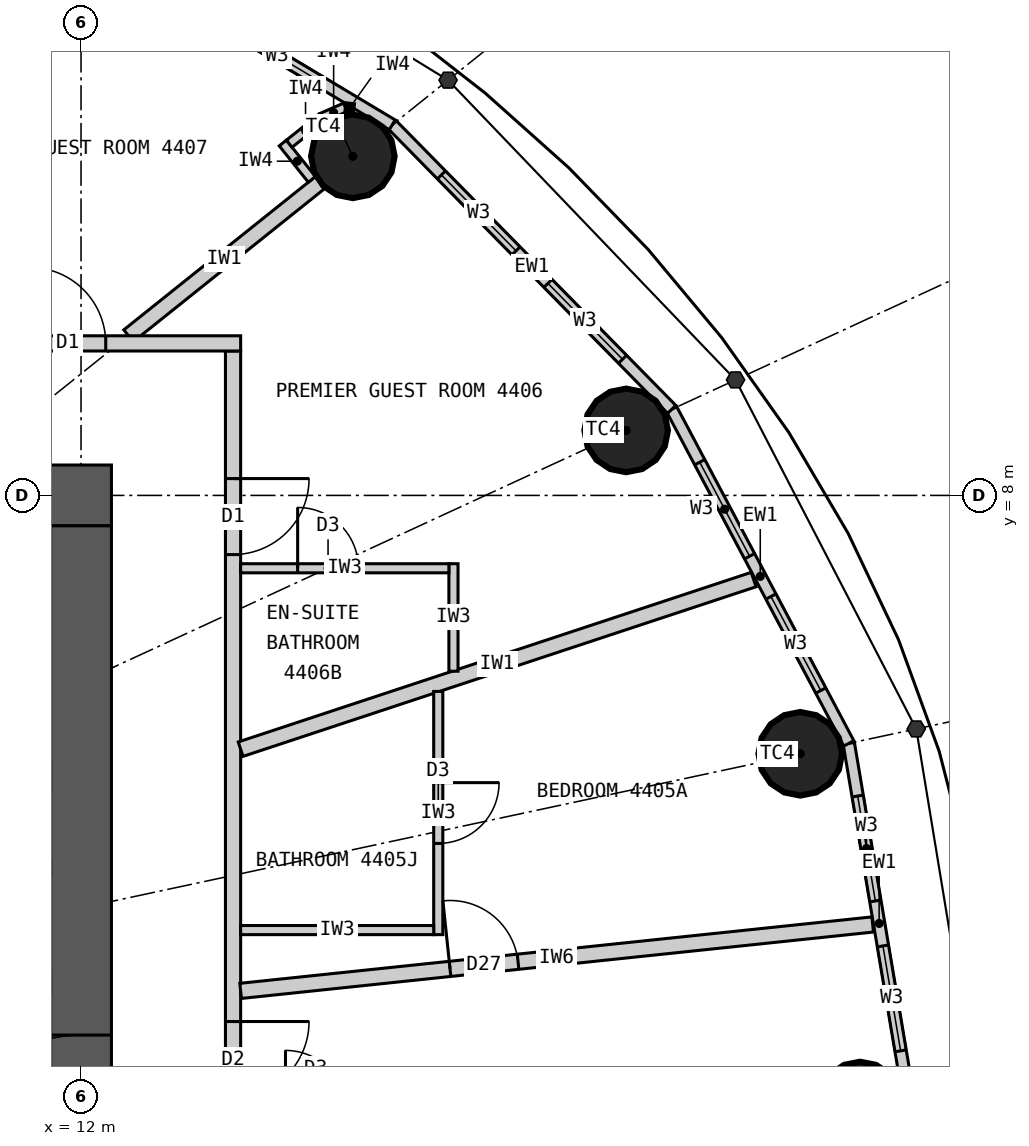
"""IFC4 building model, lengths in metres.
Left out: names, types, materials, properties, quantities, classifications, styles, units other than length and angle.
Written with IfcOpenShell. Run it as: python <this file> out.ifc"""

import sys

from ifc_helpers import new_model, si_unit, direction, frame, frame_2d, origin, origin_2d, place, context, subcontext, project, spatial, rectangle, circle, extrude, element, fill, save


model = new_model("IFC4")
c1 = context("Model", 3, precision=1e-05, world=origin(), true_north=direction((0.0, 1.0)))
c2 = subcontext(c1, "Body", "Model", "MODEL_VIEW")
j1 = project(units=[si_unit("LENGTHUNIT", "METRE"), si_unit("PLANEANGLEUNIT", "RADIAN")], contexts=[c1])
p1 = place(None, origin())
s1 = spatial("IfcSite", under=j1, at=p1, CompositionType="ELEMENT")
p2 = place(p1, origin())
s2 = spatial("IfcBuilding", under=s1, at=p2, CompositionType="ELEMENT")
p3 = place(p2, frame((0.0, 0.0, 166.5)))
s3 = spatial("IfcBuildingStorey", under=s2, at=p3, CompositionType="ELEMENT", Elevation=166.5)
for number, where, z_axis, x_axis in (
    (1, (22.25, 0.0, 0.0), (0.0, 0.0, 1.0), (1.0, 0.0, 0.0)),
    (2, (21.463, 4.601, 0.0), (0.0, 0.0, 1.0), (1.0, 0.0, 0.0)),
    (3, (19.172, 8.855, 0.0), (0.0, 0.0, 1.0), (1.0, 0.0, 0.0)),
    (4, (15.576, 12.461, 0.0), (0.0, 0.0, 1.0), (1.0, 0.0, 0.0)),
):
    element("IfcColumn", number, at=place(p3, frame(where, z_axis=z_axis, x_axis=x_axis)), inside=s3, PredefinedType="COLUMN", context=c2, shape_type="SweptSolid", body=[
        extrude(circle(Radius=0.55, at=origin_2d()), origin(), (0.0, 0.0, 1.0), 3.3),
    ])
p4 = place(p3, frame((-12.4, 8.0, 0.0), z_axis=(0.0, 0.0, 1.0), x_axis=(1.0, 0.0, 0.0)))
e5 = element("IfcWall", 5, at=p4, inside=s3, PredefinedType="SHEAR", context=c2, shape_type="SweptSolid", body=[
    extrude(rectangle(XDim=24.8, YDim=0.8, at=frame_2d((12.4, 0.0))), origin(), (0.0, 0.0, 1.0), 3.3),
])
p5 = place(p4, frame((11.1, 0.0, 0.0)))
e6 = element("IfcOpeningElement", 6, at=p5, cuts=e5, PredefinedType="OPENING", context=c2, shape_type="SweptSolid", body=[
    extrude(rectangle(XDim=1.2, YDim=2.2, at=frame_2d((0.6, 1.1))), frame((0.0, 0.41, 0.0), z_axis=(0.0, -1.0, 0.0), x_axis=(1.0, 0.0, 0.0)), (0.0, 0.0, 1.0), 0.82),
])
p6 = place(p4, frame((18.7, 0.0, 0.0)))
e7 = element("IfcOpeningElement", 7, at=p6, cuts=e5, PredefinedType="OPENING", context=c2, shape_type="SweptSolid", body=[
    extrude(rectangle(XDim=0.9, YDim=2.2, at=frame_2d((0.45, 1.1))), frame((0.0, 0.41, 0.0), z_axis=(0.0, -1.0, 0.0), x_axis=(1.0, 0.0, 0.0)), (0.0, 0.0, 1.0), 0.82),
])
p7 = place(p3, frame((12.0, -7.6, 0.0), z_axis=(0.0, 0.0, 1.0), x_axis=(0.0, 1.0, 0.0)))
e8 = element("IfcWall", 8, at=p7, inside=s3, PredefinedType="SHEAR", context=c2, shape_type="SweptSolid", body=[
    extrude(rectangle(XDim=15.2, YDim=0.8, at=frame_2d((7.6, 0.0))), origin(), (0.0, 0.0, 1.0), 3.3),
])
p8 = place(p7, frame((6.7, 0.0, 0.0)))
e9 = element("IfcOpeningElement", 9, at=p8, cuts=e8, PredefinedType="OPENING", context=c2, shape_type="SweptSolid", body=[
    extrude(rectangle(XDim=1.8, YDim=2.2, at=frame_2d((0.9, 1.1))), frame((0.0, 0.41, 0.0), z_axis=(0.0, -1.0, 0.0), x_axis=(1.0, 0.0, 0.0)), (0.0, 0.0, 1.0), 0.82),
])
p9 = place(p3, frame((22.9, 0.0, 0.0), z_axis=(0.0, 0.0, 1.0), x_axis=(-0.166162111254, 0.986098449843, 0.0)))
e10 = element("IfcWall", 10, at=p9, inside=s3, PredefinedType="ELEMENTEDWALL", context=c2, shape_type="SweptSolid", body=[
    extrude(rectangle(XDim=4.805, YDim=0.15, at=frame_2d((2.402, 0.0))), origin(), (0.0, 0.0, 1.0), 3.12),
])
p10 = place(p9, frame((0.702, 0.0, 0.9)))
e11 = element("IfcOpeningElement", 11, at=p10, cuts=e10, PredefinedType="OPENING", context=c2, shape_type="SweptSolid", body=[
    extrude(rectangle(XDim=1.4, YDim=1.9, at=frame_2d((0.7, 0.95))), frame((0.0, 0.085, 0.0), z_axis=(0.0, -1.0, 0.0), x_axis=(1.0, 0.0, 0.0)), (0.0, 0.0, 1.0), 0.17),
])
p11 = place(p9, frame((2.702, 0.0, 0.9)))
e12 = element("IfcOpeningElement", 12, at=p11, cuts=e10, PredefinedType="OPENING", context=c2, shape_type="SweptSolid", body=[
    extrude(rectangle(XDim=1.4, YDim=1.9, at=frame_2d((0.7, 0.95))), frame((0.0, 0.085, 0.0), z_axis=(0.0, -1.0, 0.0), x_axis=(1.0, 0.0, 0.0)), (0.0, 0.0, 1.0), 0.17),
])
p12 = place(p3, frame((22.102, 4.738, 0.0), z_axis=(0.0, 0.0, 1.0), x_axis=(-0.468428906714, 0.883501193748, 0.0)))
e13 = element("IfcWall", 13, at=p12, inside=s3, PredefinedType="ELEMENTEDWALL", context=c2, shape_type="SweptSolid", body=[
    extrude(rectangle(XDim=4.974, YDim=0.15, at=frame_2d((2.487, 0.0))), origin(), (0.0, 0.0, 1.0), 3.12),
])
p13 = place(p12, frame((0.787, 0.0, 0.9)))
e14 = element("IfcOpeningElement", 14, at=p13, cuts=e13, PredefinedType="OPENING", context=c2, shape_type="SweptSolid", body=[
    extrude(rectangle(XDim=1.4, YDim=1.9, at=frame_2d((0.7, 0.95))), frame((0.0, 0.085, 0.0), z_axis=(0.0, -1.0, 0.0), x_axis=(1.0, 0.0, 0.0)), (0.0, 0.0, 1.0), 0.17),
])
p14 = place(p12, frame((2.787, 0.0, 0.9)))
e15 = element("IfcOpeningElement", 15, at=p14, cuts=e13, PredefinedType="OPENING", context=c2, shape_type="SweptSolid", body=[
    extrude(rectangle(XDim=1.4, YDim=1.9, at=frame_2d((0.7, 0.95))), frame((0.0, 0.085, 0.0), z_axis=(0.0, -1.0, 0.0), x_axis=(1.0, 0.0, 0.0)), (0.0, 0.0, 1.0), 0.17),
])
p15 = place(p3, frame((19.772, 9.132, 0.0), z_axis=(0.0, 0.0, 1.0), x_axis=(-0.700727467776, 0.71342905457, 0.0)))
e16 = element("IfcWall", 16, at=p15, inside=s3, PredefinedType="ELEMENTEDWALL", context=c2, shape_type="SweptSolid", body=[
    extrude(rectangle(XDim=5.247, YDim=0.15, at=frame_2d((2.624, 0.0))), origin(), (0.0, 0.0, 1.0), 3.12),
])
p16 = place(p15, frame((0.924, 0.0, 0.9)))
e17 = element("IfcOpeningElement", 17, at=p16, cuts=e16, PredefinedType="OPENING", context=c2, shape_type="SweptSolid", body=[
    extrude(rectangle(XDim=1.4, YDim=1.9, at=frame_2d((0.7, 0.95))), frame((0.0, 0.085, 0.0), z_axis=(0.0, -1.0, 0.0), x_axis=(1.0, 0.0, 0.0)), (0.0, 0.0, 1.0), 0.17),
])
p17 = place(p15, frame((2.924, 0.0, 0.9)))
e18 = element("IfcOpeningElement", 18, at=p17, cuts=e16, PredefinedType="OPENING", context=c2, shape_type="SweptSolid", body=[
    extrude(rectangle(XDim=1.4, YDim=1.9, at=frame_2d((0.7, 0.95))), frame((0.0, 0.085, 0.0), z_axis=(0.0, -1.0, 0.0), x_axis=(1.0, 0.0, 0.0)), (0.0, 0.0, 1.0), 0.17),
])
p18 = place(p3, frame((16.095, 12.876, 0.0), z_axis=(0.0, 0.0, 1.0), x_axis=(-0.857695199231, 0.514158482587, 0.0)))
e19 = element("IfcWall", 19, at=p18, inside=s3, PredefinedType="ELEMENTEDWALL", context=c2, shape_type="SweptSolid", body=[
    extrude(rectangle(XDim=5.536, YDim=0.15, at=frame_2d((2.768, 0.0))), origin(), (0.0, 0.0, 1.0), 3.12),
])
p19 = place(p18, frame((1.068, 0.0, 0.9)))
e20 = element("IfcOpeningElement", 20, at=p19, cuts=e19, PredefinedType="OPENING", context=c2, shape_type="SweptSolid", body=[
    extrude(rectangle(XDim=1.4, YDim=1.9, at=frame_2d((0.7, 0.95))), frame((0.0, 0.085, 0.0), z_axis=(0.0, -1.0, 0.0), x_axis=(1.0, 0.0, 0.0)), (0.0, 0.0, 1.0), 0.17),
])
p20 = place(p18, frame((3.068, 0.0, 0.9)))
e21 = element("IfcOpeningElement", 21, at=p20, cuts=e19, PredefinedType="OPENING", context=c2, shape_type="SweptSolid", body=[
    extrude(rectangle(XDim=1.4, YDim=1.9, at=frame_2d((0.7, 0.95))), frame((0.0, 0.085, 0.0), z_axis=(0.0, -1.0, 0.0), x_axis=(1.0, 0.0, 0.0)), (0.0, 0.0, 1.0), 0.17),
])
p21 = place(p3, frame((14.0, -9.9, 0.0), z_axis=(0.0, 0.0, 1.0), x_axis=(0.0, 1.0, 0.0)))
e22 = element("IfcWall", 22, at=p21, inside=s3, PredefinedType="PARTITIONING", context=c2, shape_type="SweptSolid", body=[
    extrude(rectangle(XDim=19.8, YDim=0.2, at=frame_2d((9.9, 0.0))), origin(), (0.0, 0.0, 1.0), 3.12),
])
p22 = place(p21, frame((3.688, 0.0, 0.0)))
e23 = element("IfcOpeningElement", 23, at=p22, cuts=e22, PredefinedType="OPENING", context=c2, shape_type="SweptSolid", body=[
    extrude(rectangle(XDim=1.0, YDim=2.2, at=frame_2d((0.5, 1.1))), frame((0.0, 0.11, 0.0), z_axis=(0.0, -1.0, 0.0), x_axis=(1.0, 0.0, 0.0)), (0.0, 0.0, 1.0), 0.22),
])
p23 = place(p21, frame((9.979, 0.0, 0.0)))
e24 = element("IfcOpeningElement", 24, at=p23, cuts=e22, PredefinedType="OPENING", context=c2, shape_type="SweptSolid", body=[
    extrude(rectangle(XDim=1.0, YDim=2.2, at=frame_2d((0.5, 1.1))), frame((0.0, 0.11, 0.0), z_axis=(0.0, -1.0, 0.0), x_axis=(1.0, 0.0, 0.0)), (0.0, 0.0, 1.0), 0.22),
])
p24 = place(p21, frame((17.122, 0.0, 0.0)))
e25 = element("IfcOpeningElement", 25, at=p24, cuts=e22, PredefinedType="OPENING", context=c2, shape_type="SweptSolid", body=[
    extrude(rectangle(XDim=1.0, YDim=2.2, at=frame_2d((0.5, 1.1))), frame((0.0, 0.11, 0.0), z_axis=(0.0, -1.0, 0.0), x_axis=(1.0, 0.0, 0.0)), (0.0, 0.0, 1.0), 0.22),
])
p25 = place(p3, frame((14.1, 1.481, 0.0), z_axis=(0.0, 0.0, 1.0), x_axis=(0.994524794819, 0.104500873159, 0.0)))
e26 = element("IfcWall", 26, at=p25, inside=s3, PredefinedType="PARTITIONING", context=c2, shape_type="SweptSolid", body=[
    extrude(rectangle(XDim=8.362, YDim=0.2, at=frame_2d((4.181, 0.0))), origin(), (0.0, 0.0, 1.0), 2.47),
])
p26 = place(p25, frame((2.77, 0.0, 0.0)))
e27 = element("IfcOpeningElement", 27, at=p26, cuts=e26, PredefinedType="OPENING", context=c2, shape_type="SweptSolid", body=[
    extrude(rectangle(XDim=0.9, YDim=2.1, at=frame_2d((0.45, 1.05))), frame((0.0, 0.11, 0.0), z_axis=(0.0, -1.0, 0.0), x_axis=(1.0, 0.0, 0.0)), (0.0, 0.0, 1.0), 0.22),
])
p27 = place(p3, frame((14.1, 4.661, 0.0), z_axis=(0.0, 0.0, 1.0), x_axis=(0.949453216399, 0.313908569285, 0.0)))
e28 = element("IfcWall", 28, at=p27, inside=s3, PredefinedType="PARTITIONING", context=c2, shape_type="SweptSolid", body=[
    extrude(rectangle(XDim=7.109, YDim=0.2, at=frame_2d((3.554, 0.0))), origin(), (0.0, 0.0, 1.0), 3.12),
])
p28 = place(p3, frame((12.625, 10.1, 0.0), z_axis=(0.0, 0.0, 1.0), x_axis=(0.780876185034, 0.624685827954, 0.0)))
e29 = element("IfcWall", 29, at=p28, inside=s3, PredefinedType="PARTITIONING", context=c2, shape_type="SweptSolid", body=[
    extrude(rectangle(XDim=3.229, YDim=0.2, at=frame_2d((1.615, 0.0))), origin(), (0.0, 0.0, 1.0), 2.42),
])
p29 = place(p3, frame((16.7, 5.421, 0.0), z_axis=(0.0, 0.0, 1.0), x_axis=(0.0, -1.0, 0.0)))
e30 = element("IfcWall", 30, at=p29, inside=s3, PredefinedType="PARTITIONING", context=c2, shape_type="SweptSolid", body=[
    extrude(rectangle(XDim=3.2, YDim=0.12, at=frame_2d((1.6, 0.0))), origin(), (0.0, 0.0, 1.0), 3.12),
])
p30 = place(p29, frame((1.2, 0.0, 0.0)))
e31 = element("IfcOpeningElement", 31, at=p30, cuts=e30, PredefinedType="OPENING", context=c2, shape_type="SweptSolid", body=[
    extrude(rectangle(XDim=0.8, YDim=2.1, at=frame_2d((0.4, 1.05))), frame((0.0, 0.07, 0.0), z_axis=(0.0, -1.0, 0.0), x_axis=(1.0, 0.0, 0.0)), (0.0, 0.0, 1.0), 0.14),
])
p31 = place(p3, frame((14.1, 2.281, 0.0), z_axis=(0.0, 0.0, 1.0), x_axis=(1.0, 0.0, 0.0)))
e32 = element("IfcWall", 32, at=p31, inside=s3, PredefinedType="PARTITIONING", context=c2, shape_type="SweptSolid", body=[
    extrude(rectangle(XDim=2.54, YDim=0.12, at=frame_2d((1.27, 0.0))), origin(), (0.0, 0.0, 1.0), 3.12),
])
p32 = place(p3, frame((16.9, 5.687, 0.0), z_axis=(0.0, 0.0, 1.0), x_axis=(0.0, 1.0, 0.0)))
e33 = element("IfcWall", 33, at=p32, inside=s3, PredefinedType="PARTITIONING", context=c2, shape_type="SweptSolid", body=[
    extrude(rectangle(XDim=1.414, YDim=0.12, at=frame_2d((0.707, 0.0))), origin(), (0.0, 0.0, 1.0), 3.12),
])
p33 = place(p3, frame((14.1, 7.042, 0.0), z_axis=(0.0, 0.0, 1.0), x_axis=(1.0, 0.0, 0.0)))
e34 = element("IfcWall", 34, at=p33, inside=s3, PredefinedType="PARTITIONING", context=c2, shape_type="SweptSolid", body=[
    extrude(rectangle(XDim=2.74, YDim=0.12, at=frame_2d((1.37, 0.0))), origin(), (0.0, 0.0, 1.0), 3.12),
])
p34 = place(p33, frame((0.75, 0.0, 0.0)))
e35 = element("IfcOpeningElement", 35, at=p34, cuts=e34, PredefinedType="OPENING", context=c2, shape_type="SweptSolid", body=[
    extrude(rectangle(XDim=0.8, YDim=2.1, at=frame_2d((0.4, 1.05))), frame((0.0, 0.07, 0.0), z_axis=(0.0, -1.0, 0.0), x_axis=(1.0, 0.0, 0.0)), (0.0, 0.0, 1.0), 0.14),
])
p35 = place(p3, frame((1.67, 10.0, 0.0), z_axis=(0.0, 0.0, 1.0), x_axis=(1.0, 0.0, 0.0)))
e36 = element("IfcWall", 36, at=p35, inside=s3, PredefinedType="PARTITIONING", context=c2, shape_type="SweptSolid", body=[
    extrude(rectangle(XDim=12.43, YDim=0.2, at=frame_2d((6.215, 0.0))), origin(), (0.0, 0.0, 1.0), 3.12),
])
p36 = place(p35, frame((9.655, 0.0, 0.0)))
e37 = element("IfcOpeningElement", 37, at=p36, cuts=e36, PredefinedType="OPENING", context=c2, shape_type="SweptSolid", body=[
    extrude(rectangle(XDim=1.0, YDim=2.2, at=frame_2d((0.5, 1.1))), frame((0.0, 0.11, 0.0), z_axis=(0.0, -1.0, 0.0), x_axis=(1.0, 0.0, 0.0)), (0.0, 0.0, 1.0), 0.22),
])
p37 = place(p3, frame((15.037, 12.158, 0.0), z_axis=(0.0, 0.0, 1.0), x_axis=(-0.624840920722, 0.78075208856, 0.0)))
e38 = element("IfcWall", 38, at=p37, inside=s3, PredefinedType="PARTITIONING", context=c2, shape_type="SweptSolid", body=[
    extrude(rectangle(XDim=0.612, YDim=0.12, at=frame_2d((0.306, 0.0))), origin(), (0.0, 0.0, 1.0), 3.12),
])
p38 = place(p3, frame((14.739, 12.627, 0.0), z_axis=(0.0, 0.0, 1.0), x_axis=(0.780912119987, 0.624640905527, 0.0)))
e39 = element("IfcWall", 39, at=p38, inside=s3, PredefinedType="PARTITIONING", context=c2, shape_type="SweptSolid", body=[
    extrude(rectangle(XDim=0.55, YDim=0.12, at=frame_2d((0.275, 0.0))), origin(), (0.0, 0.0, 1.0), 3.12),
])
p39 = place(p3, frame((15.169, 12.97, 0.0), z_axis=(0.0, 0.0, 1.0), x_axis=(0.915974725257, 0.401235968838, 0.0)))
e40 = element("IfcWall", 40, at=p39, inside=s3, PredefinedType="PARTITIONING", context=c2, shape_type="SweptSolid", body=[
    extrude(rectangle(XDim=0.338, YDim=0.12, at=frame_2d((0.169, 0.0))), origin(), (0.0, 0.0, 1.0), 3.12),
])
p40 = place(p3, frame((15.478, 13.106, 0.0), z_axis=(0.0, 0.0, 1.0), x_axis=(0.993778813557, -0.111371763588, 0.0)))
e41 = element("IfcWall", 41, at=p40, inside=s3, PredefinedType="PARTITIONING", context=c2, shape_type="SweptSolid", body=[
    extrude(rectangle(XDim=0.114, YDim=0.12, at=frame_2d((0.057, 0.0))), origin(), (0.0, 0.0, 1.0), 3.12),
])
p41 = place(p10, origin())
e42 = element("IfcWindow", 42, at=p41, inside=s3, PartitioningType="SINGLE_PANEL", PredefinedType="WINDOW", context=c2, shape_type="SweptSolid", body=[
    extrude(rectangle(XDim=1.4, YDim=1.9, at=frame_2d((0.7, 0.95))), frame((0.0, 0.03, 0.0), z_axis=(0.0, -1.0, 0.0), x_axis=(1.0, 0.0, 0.0)), (0.0, 0.0, 1.0), 0.06),
])
fill(e11, e42)
p42 = place(p11, origin())
e43 = element("IfcWindow", 43, at=p42, inside=s3, PartitioningType="SINGLE_PANEL", PredefinedType="WINDOW", context=c2, shape_type="SweptSolid", body=[
    extrude(rectangle(XDim=1.4, YDim=1.9, at=frame_2d((0.7, 0.95))), frame((0.0, 0.03, 0.0), z_axis=(0.0, -1.0, 0.0), x_axis=(1.0, 0.0, 0.0)), (0.0, 0.0, 1.0), 0.06),
])
fill(e12, e43)
p43 = place(p13, origin())
e44 = element("IfcWindow", 44, at=p43, inside=s3, PartitioningType="SINGLE_PANEL", PredefinedType="WINDOW", context=c2, shape_type="SweptSolid", body=[
    extrude(rectangle(XDim=1.4, YDim=1.9, at=frame_2d((0.7, 0.95))), frame((0.0, 0.03, 0.0), z_axis=(0.0, -1.0, 0.0), x_axis=(1.0, 0.0, 0.0)), (0.0, 0.0, 1.0), 0.06),
])
fill(e14, e44)
p44 = place(p14, origin())
e45 = element("IfcWindow", 45, at=p44, inside=s3, PartitioningType="SINGLE_PANEL", PredefinedType="WINDOW", context=c2, shape_type="SweptSolid", body=[
    extrude(rectangle(XDim=1.4, YDim=1.9, at=frame_2d((0.7, 0.95))), frame((0.0, 0.03, 0.0), z_axis=(0.0, -1.0, 0.0), x_axis=(1.0, 0.0, 0.0)), (0.0, 0.0, 1.0), 0.06),
])
fill(e15, e45)
p45 = place(p16, origin())
e46 = element("IfcWindow", 46, at=p45, inside=s3, PartitioningType="SINGLE_PANEL", PredefinedType="WINDOW", context=c2, shape_type="SweptSolid", body=[
    extrude(rectangle(XDim=1.4, YDim=1.9, at=frame_2d((0.7, 0.95))), frame((0.0, 0.03, 0.0), z_axis=(0.0, -1.0, 0.0), x_axis=(1.0, 0.0, 0.0)), (0.0, 0.0, 1.0), 0.06),
])
fill(e17, e46)
p46 = place(p17, origin())
e47 = element("IfcWindow", 47, at=p46, inside=s3, PartitioningType="SINGLE_PANEL", PredefinedType="WINDOW", context=c2, shape_type="SweptSolid", body=[
    extrude(rectangle(XDim=1.4, YDim=1.9, at=frame_2d((0.7, 0.95))), frame((0.0, 0.03, 0.0), z_axis=(0.0, -1.0, 0.0), x_axis=(1.0, 0.0, 0.0)), (0.0, 0.0, 1.0), 0.06),
])
fill(e18, e47)
p47 = place(p19, origin())
e48 = element("IfcWindow", 48, at=p47, inside=s3, PartitioningType="SINGLE_PANEL", PredefinedType="WINDOW", context=c2, shape_type="SweptSolid", body=[
    extrude(rectangle(XDim=1.4, YDim=1.9, at=frame_2d((0.7, 0.95))), frame((0.0, 0.03, 0.0), z_axis=(0.0, -1.0, 0.0), x_axis=(1.0, 0.0, 0.0)), (0.0, 0.0, 1.0), 0.06),
])
fill(e20, e48)
p48 = place(p23, origin())
e49 = element("IfcDoor", 49, at=p48, inside=s3, OperationType="SINGLE_SWING_RIGHT", PredefinedType="DOOR", context=c2, shape_type="SweptSolid", body=[
    extrude(rectangle(XDim=1.0, YDim=2.2, at=frame_2d((0.5, 1.1))), frame((0.0, 0.025, 0.0), z_axis=(0.0, -1.0, 0.0), x_axis=(1.0, 0.0, 0.0)), (0.0, 0.0, 1.0), 0.05),
])
fill(e24, e49)
p49 = place(p30, origin())
e50 = element("IfcDoor", 50, at=p49, inside=s3, OperationType="SINGLE_SWING_LEFT", PredefinedType="DOOR", context=c2, shape_type="SweptSolid", body=[
    extrude(rectangle(XDim=0.8, YDim=2.1, at=frame_2d((0.4, 1.05))), frame((0.0, 0.025, 0.0), z_axis=(0.0, -1.0, 0.0), x_axis=(1.0, 0.0, 0.0)), (0.0, 0.0, 1.0), 0.05),
])
fill(e31, e50)
p50 = place(p26, origin())
e51 = element("IfcDoor", 51, at=p50, inside=s3, OperationType="SINGLE_SWING_LEFT", PredefinedType="DOOR", context=c2, shape_type="SweptSolid", body=[
    extrude(rectangle(XDim=0.9, YDim=2.1, at=frame_2d((0.45, 1.05))), frame((0.0, 0.025, 0.0), z_axis=(0.0, -1.0, 0.0), x_axis=(1.0, 0.0, 0.0)), (0.0, 0.0, 1.0), 0.05),
])
fill(e27, e51)
p51 = place(p34, origin())
e52 = element("IfcDoor", 52, at=p51, inside=s3, OperationType="SINGLE_SWING_LEFT", PredefinedType="DOOR", context=c2, shape_type="SweptSolid", body=[
    extrude(rectangle(XDim=0.8, YDim=2.1, at=frame_2d((0.4, 1.05))), frame((0.0, 0.025, 0.0), z_axis=(0.0, -1.0, 0.0), x_axis=(1.0, 0.0, 0.0)), (0.0, 0.0, 1.0), 0.05),
])
fill(e35, e52)
p52 = place(p24, origin())
e53 = element("IfcDoor", 53, at=p52, inside=s3, OperationType="SINGLE_SWING_RIGHT", PredefinedType="DOOR", context=c2, shape_type="SweptSolid", body=[
    extrude(rectangle(XDim=1.0, YDim=2.2, at=frame_2d((0.5, 1.1))), frame((0.0, 0.025, 0.0), z_axis=(0.0, -1.0, 0.0), x_axis=(1.0, 0.0, 0.0)), (0.0, 0.0, 1.0), 0.05),
])
fill(e25, e53)
p53 = place(p36, origin())
e54 = element("IfcDoor", 54, at=p53, inside=s3, OperationType="SINGLE_SWING_LEFT", PredefinedType="DOOR", context=c2, shape_type="SweptSolid", body=[
    extrude(rectangle(XDim=1.0, YDim=2.2, at=frame_2d((0.5, 1.1))), frame((0.0, 0.025, 0.0), z_axis=(0.0, -1.0, 0.0), x_axis=(1.0, 0.0, 0.0)), (0.0, 0.0, 1.0), 0.05),
])
fill(e37, e54)
p54 = place(p8, origin())
e55 = element("IfcDoor", 55, at=p54, inside=s3, OperationType="DOUBLE_DOOR_DOUBLE_SWING", PredefinedType="DOOR", context=c2, shape_type="SweptSolid", body=[
    extrude(rectangle(XDim=1.8, YDim=2.2, at=frame_2d((0.9, 1.1))), frame((0.0, 0.025, 0.0), z_axis=(0.0, -1.0, 0.0), x_axis=(1.0, 0.0, 0.0)), (0.0, 0.0, 1.0), 0.05),
])
fill(e9, e55)
save(model, sys.argv[1])
